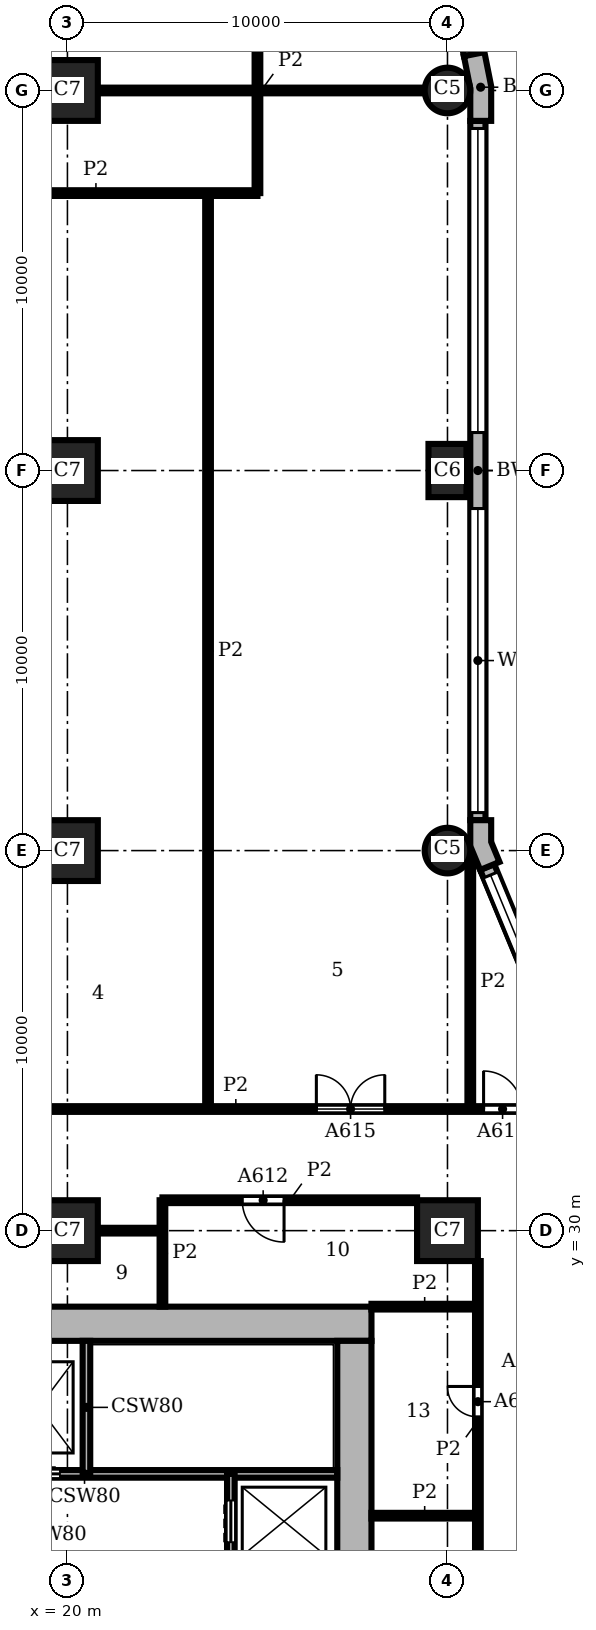
"""IFC4 building model, lengths in metres.
Left out: names, types, materials, properties, quantities, classifications, styles, units other than length and angle.
Written with IfcOpenShell. Run it as: python <this file> out.ifc"""

import sys

from ifc_helpers import new_model, si_unit, direction, frame, frame_2d, origin, origin_2d, place, context, subcontext, project, spatial, polyline, rectangle, circle, outline, extrude, element, fill, save


model = new_model("IFC4")
c1 = context("Model", 3, precision=1e-05, world=origin(), true_north=direction((0.0, 1.0)))
c2 = subcontext(c1, "Body", "Model", "MODEL_VIEW")
j1 = project(units=[si_unit("LENGTHUNIT", "METRE"), si_unit("PLANEANGLEUNIT", "RADIAN")], contexts=[c1])
p1 = place(None, origin())
s1 = spatial("IfcSite", under=j1, at=p1, CompositionType="ELEMENT")
p2 = place(p1, origin())
s2 = spatial("IfcBuilding", under=s1, at=p2, CompositionType="ELEMENT")
p3 = place(p2, frame((0.0, 0.0, 70.5)))
s3 = spatial("IfcBuildingStorey", under=s2, at=p3, CompositionType="ELEMENT", Elevation=70.5)
p4 = place(p3, frame((30.0, 40.0, 0.0), z_axis=(0.0, 0.0, 1.0), x_axis=(1.0, 0.0, 0.0)))
e1 = element("IfcColumn", 1, at=p4, inside=s3, PredefinedType="COLUMN", context=c2, shape_type="SweptSolid", body=[
    extrude(circle(Radius=0.6, at=origin_2d()), origin(), (0.0, 0.0, 1.0), 3.9),
])
p5 = place(p3, frame((30.0, 50.0, 0.0), z_axis=(0.0, 0.0, 1.0), x_axis=(0.0, 1.0, 0.0)))
e2 = element("IfcColumn", 2, at=p5, inside=s3, PredefinedType="COLUMN", context=c2, shape_type="SweptSolid", body=[
    extrude(rectangle(XDim=1.4, YDim=1.0, at=origin_2d()), origin(), (0.0, 0.0, 1.0), 3.9),
])
p6 = place(p3, frame((30.0, 60.0, 0.0), z_axis=(0.0, 0.0, 1.0), x_axis=(1.0, 0.0, 0.0)))
e3 = element("IfcColumn", 3, at=p6, inside=s3, PredefinedType="COLUMN", context=c2, shape_type="SweptSolid", body=[
    extrude(circle(Radius=0.6, at=origin_2d()), origin(), (0.0, 0.0, 1.0), 3.9),
])
for number, where, z_axis, x_axis in (
    (4, (20.0, 30.0, 0.0), (0.0, 0.0, 1.0), (1.0, 0.0, 0.0)),
    (5, (20.0, 40.0, 0.0), (0.0, 0.0, 1.0), (1.0, 0.0, 0.0)),
    (6, (20.0, 50.0, 0.0), (0.0, 0.0, 1.0), (1.0, 0.0, 0.0)),
    (7, (20.0, 60.0, 0.0), (0.0, 0.0, 1.0), (1.0, 0.0, 0.0)),
    (8, (30.0, 30.0, 0.0), (0.0, 0.0, 1.0), (1.0, 0.0, 0.0)),
):
    element("IfcColumn", number, at=place(p3, frame(where, z_axis=z_axis, x_axis=x_axis)), inside=s3, PredefinedType="COLUMN", context=c2, shape_type="SweptSolid", body=[
        extrude(rectangle(XDim=1.6, YDim=1.6, at=origin_2d()), origin(), (0.0, 0.0, 1.0), 3.9),
    ])
p7 = place(p3, frame((27.55, 8.9, 0.0), z_axis=(0.0, 0.0, 1.0), x_axis=(0.0, 1.0, 0.0)))
e9 = element("IfcWall", 9, at=p7, inside=s3, PredefinedType="SHEAR", context=c2, shape_type="SweptSolid", body=[
    extrude(rectangle(XDim=18.2, YDim=0.9, at=frame_2d((9.1, 0.0))), origin(), (0.0, 0.0, 1.0), 3.9),
])
p8 = place(p7, frame((4.55, 0.0, 0.0)))
e10 = element("IfcOpeningElement", 10, at=p8, cuts=e9, PredefinedType="OPENING", context=c2, shape_type="SweptSolid", body=[
    extrude(rectangle(XDim=1.6, YDim=2.1, at=frame_2d((0.8, 1.05))), frame((0.0, 0.46, 0.0), z_axis=(0.0, -1.0, 0.0), x_axis=(1.0, 0.0, 0.0)), (0.0, 0.0, 1.0), 0.92),
])
p9 = place(p3, frame((28.0, 27.55, 0.0), z_axis=(0.0, 0.0, 1.0), x_axis=(-1.0, 0.0, 0.0)))
e11 = element("IfcWall", 11, at=p9, inside=s3, PredefinedType="SHEAR", context=c2, shape_type="SweptSolid", body=[
    extrude(rectangle(XDim=20.0, YDim=0.9, at=frame_2d((10.0, 0.0))), origin(), (0.0, 0.0, 1.0), 3.9),
])
p10 = place(p3, origin())
e12 = element("IfcWall", 12, at=p10, inside=s3, PredefinedType="SOLIDWALL", context=c2, shape_type="SweptSolid", body=[
    extrude(outline(polyline([(31.23, 39.644), (31.369, 39.701), (31.15, 40.229), (31.15, 40.8), (31.0, 40.8), (30.6, 40.8), (30.6, 40.119), (30.861, 39.49), (31.23, 39.644)])), origin(), (0.0, 0.0, 1.0), 3.9),
])
e13 = element("IfcWall", 13, at=p10, inside=s3, PredefinedType="SOLIDWALL", context=c2, shape_type="SweptSolid", body=[
    extrude(outline(polyline([(31.0, 59.2), (31.15, 59.2), (31.15, 60.113), (30.972, 61.009), (30.825, 60.98), (30.432, 60.902), (30.6, 60.059), (30.6, 59.2), (31.0, 59.2)])), origin(), (0.0, 0.0, 1.0), 3.9),
])
p11 = place(p3, frame((33.362, 33.974, 0.0), z_axis=(0.0, 0.0, 1.0), x_axis=(-0.382655745237, 0.923891000409, 0.0)))
e14 = element("IfcWall", 14, at=p11, inside=s3, PredefinedType="SOLIDWALL", context=c2, shape_type="SweptSolid", body=[
    extrude(rectangle(XDim=6.053, YDim=0.4, at=frame_2d((3.027, 0.0))), origin(), (0.0, 0.0, 1.0), 3.9),
])
p12 = place(p11, frame((0.227, 0.0, 0.9)))
e15 = element("IfcOpeningElement", 15, at=p12, cuts=e14, PredefinedType="OPENING", context=c2, shape_type="SweptSolid", body=[
    extrude(rectangle(XDim=5.6, YDim=2.35, at=frame_2d((2.8, 1.175))), frame((0.0, 0.21, 0.0), z_axis=(0.0, -1.0, 0.0), x_axis=(1.0, 0.0, 0.0)), (0.0, 0.0, 1.0), 0.42),
])
p13 = place(p3, frame((30.8, 40.8, 0.0), z_axis=(0.0, 0.0, 1.0), x_axis=(0.0, 1.0, 0.0)))
e16 = element("IfcWall", 16, at=p13, inside=s3, PredefinedType="SOLIDWALL", context=c2, shape_type="SweptSolid", body=[
    extrude(rectangle(XDim=18.4, YDim=0.4, at=frame_2d((9.2, 0.0))), origin(), (0.0, 0.0, 1.0), 3.9),
])
p14 = place(p13, frame((0.2, 0.0, 0.9)))
e17 = element("IfcOpeningElement", 17, at=p14, cuts=e16, PredefinedType="OPENING", context=c2, shape_type="SweptSolid", body=[
    extrude(rectangle(XDim=8.0, YDim=2.35, at=frame_2d((4.0, 1.175))), frame((0.0, 0.21, 0.0), z_axis=(0.0, -1.0, 0.0), x_axis=(1.0, 0.0, 0.0)), (0.0, 0.0, 1.0), 0.42),
])
p15 = place(p13, frame((10.2, 0.0, 0.9)))
e18 = element("IfcOpeningElement", 18, at=p15, cuts=e16, PredefinedType="OPENING", context=c2, shape_type="SweptSolid", body=[
    extrude(rectangle(XDim=8.0, YDim=2.35, at=frame_2d((4.0, 1.175))), frame((0.0, 0.21, 0.0), z_axis=(0.0, -1.0, 0.0), x_axis=(1.0, 0.0, 0.0)), (0.0, 0.0, 1.0), 0.42),
])
p16 = place(p3, frame((30.629, 60.941, 0.0), z_axis=(0.0, 0.0, 1.0), x_axis=(-0.195098533057, 0.98078364709, 0.0)))
e19 = element("IfcWall", 19, at=p16, inside=s3, PredefinedType="SOLIDWALL", context=c2, shape_type="SweptSolid", body=[
    extrude(rectangle(XDim=4.753, YDim=0.4, at=frame_2d((2.376, 0.0))), origin(), (0.0, 0.0, 1.0), 3.9),
])
p17 = place(p16, frame((0.226, 0.0, 0.9)))
e20 = element("IfcOpeningElement", 20, at=p17, cuts=e19, PredefinedType="OPENING", context=c2, shape_type="SweptSolid", body=[
    extrude(rectangle(XDim=4.3, YDim=2.35, at=frame_2d((2.15, 1.175))), frame((0.0, 0.21, 0.0), z_axis=(0.0, -1.0, 0.0), x_axis=(1.0, 0.0, 0.0)), (0.0, 0.0, 1.0), 0.42),
])
p18 = place(p3, frame((13.8, 23.6, 0.0), z_axis=(0.0, 0.0, 1.0), x_axis=(1.0, 0.0, 0.0)))
e21 = element("IfcWall", 21, at=p18, inside=s3, PredefinedType="SHEAR", context=c2, shape_type="SweptSolid", body=[
    extrude(rectangle(XDim=13.3, YDim=0.2, at=frame_2d((6.65, 0.0))), origin(), (0.0, 0.0, 1.0), 3.58),
])
p19 = place(p18, frame((2.4, 0.0, 0.0)))
e22 = element("IfcOpeningElement", 22, at=p19, cuts=e21, PredefinedType="OPENING", context=c2, shape_type="SweptSolid", body=[
    extrude(rectangle(XDim=1.1, YDim=2.1, at=frame_2d((0.55, 1.05))), frame((0.0, 0.11, 0.0), z_axis=(0.0, -1.0, 0.0), x_axis=(1.0, 0.0, 0.0)), (0.0, 0.0, 1.0), 0.22),
])
p20 = place(p18, frame((4.9, 0.0, 0.0)))
e23 = element("IfcOpeningElement", 23, at=p20, cuts=e21, PredefinedType="OPENING", context=c2, shape_type="SweptSolid", body=[
    extrude(rectangle(XDim=1.1, YDim=2.1, at=frame_2d((0.55, 1.05))), frame((0.0, 0.11, 0.0), z_axis=(0.0, -1.0, 0.0), x_axis=(1.0, 0.0, 0.0)), (0.0, 0.0, 1.0), 0.22),
])
p21 = place(p18, frame((0.25, 0.0, 0.0)))
e24 = element("IfcOpeningElement", 24, at=p21, cuts=e21, PredefinedType="OPENING", context=c2, shape_type="SweptSolid", body=[
    extrude(rectangle(XDim=1.0, YDim=2.1, at=frame_2d((0.5, 1.05))), frame((0.0, 0.11, 0.0), z_axis=(0.0, -1.0, 0.0), x_axis=(1.0, 0.0, 0.0)), (0.0, 0.0, 1.0), 0.22),
])
p22 = place(p3, frame((20.5, 23.6, 0.0), z_axis=(0.0, 0.0, 1.0), x_axis=(0.0, 1.0, 0.0)))
e25 = element("IfcWall", 25, at=p22, inside=s3, PredefinedType="SHEAR", context=c2, shape_type="SweptSolid", body=[
    extrude(rectangle(XDim=3.5, YDim=0.2, at=frame_2d((1.75, 0.0))), origin(), (0.0, 0.0, 1.0), 3.58),
])
p23 = place(p3, frame((24.3, 16.1, 0.0), z_axis=(0.0, 0.0, 1.0), x_axis=(0.0, 1.0, 0.0)))
e26 = element("IfcWall", 26, at=p23, inside=s3, PredefinedType="SHEAR", context=c2, shape_type="SweptSolid", body=[
    extrude(rectangle(XDim=7.5, YDim=0.2, at=frame_2d((3.75, 0.0))), origin(), (0.0, 0.0, 1.0), 3.58),
])
p24 = place(p23, frame((5.7, 0.0, 0.0)))
e27 = element("IfcOpeningElement", 27, at=p24, cuts=e26, PredefinedType="OPENING", context=c2, shape_type="SweptSolid", body=[
    extrude(rectangle(XDim=1.1, YDim=2.1, at=frame_2d((0.55, 1.05))), frame((0.0, 0.11, 0.0), z_axis=(0.0, -1.0, 0.0), x_axis=(1.0, 0.0, 0.0)), (0.0, 0.0, 1.0), 0.22),
])
p25 = place(p3, frame((22.5, 28.0, 0.0), z_axis=(0.0, 0.0, 1.0), x_axis=(0.0, 1.0, 0.0)))
e28 = element("IfcWall", 28, at=p25, inside=s3, PredefinedType="PARTITIONING", context=c2, shape_type="SweptSolid", body=[
    extrude(rectangle(XDim=2.8, YDim=0.15, at=frame_2d((1.4, 0.0))), origin(), (0.0, 0.0, 1.0), 3.58),
])
p26 = place(p3, frame((23.7, 33.2, 0.0), z_axis=(0.0, 0.0, 1.0), x_axis=(0.0, 1.0, 0.0)))
e29 = element("IfcWall", 29, at=p26, inside=s3, PredefinedType="PARTITIONING", context=c2, shape_type="SweptSolid", body=[
    extrude(rectangle(XDim=24.1, YDim=0.15, at=frame_2d((12.05, 0.0))), origin(), (0.0, 0.0, 1.0), 3.58),
])
p27 = place(p3, frame((25.0, 57.3, 0.0), z_axis=(0.0, 0.0, 1.0), x_axis=(0.0, 1.0, 0.0)))
e30 = element("IfcWall", 30, at=p27, inside=s3, PredefinedType="PARTITIONING", context=c2, shape_type="SweptSolid", body=[
    extrude(rectangle(XDim=10.7, YDim=0.15, at=frame_2d((5.35, 0.0))), origin(), (0.0, 0.0, 1.0), 3.58),
])
p28 = place(p3, frame((30.6, 33.2, 0.0), z_axis=(0.0, 0.0, 1.0), x_axis=(0.0, 1.0, 0.0)))
e31 = element("IfcWall", 31, at=p28, inside=s3, PredefinedType="PARTITIONING", context=c2, shape_type="SweptSolid", body=[
    extrude(rectangle(XDim=6.699, YDim=0.15, at=frame_2d((3.35, 0.0))), origin(), (0.0, 0.0, 1.0), 3.58),
])
p29 = place(p3, frame((30.8, 20.8, 0.0), z_axis=(0.0, 0.0, 1.0), x_axis=(0.0, 1.0, 0.0)))
e32 = element("IfcWall", 32, at=p29, inside=s3, PredefinedType="PARTITIONING", context=c2, shape_type="SweptSolid", body=[
    extrude(rectangle(XDim=8.4, YDim=0.15, at=frame_2d((4.2, 0.0))), origin(), (0.0, 0.0, 1.0), 3.58),
])
p30 = place(p29, frame((4.3, 0.0, 0.0)))
e33 = element("IfcOpeningElement", 33, at=p30, cuts=e32, PredefinedType="OPENING", context=c2, shape_type="SweptSolid", body=[
    extrude(rectangle(XDim=0.8, YDim=2.1, at=frame_2d((0.4, 1.05))), frame((0.0, 0.085, 0.0), z_axis=(0.0, -1.0, 0.0), x_axis=(1.0, 0.0, 0.0)), (0.0, 0.0, 1.0), 0.17),
])
for number, where, z_axis, x_axis in (
    (34, (28.0, 22.5, 0.0), (0.0, 0.0, 1.0), (1.0, 0.0, 0.0)),
    (35, (28.0, 28.0, 0.0), (0.0, 0.0, 1.0), (1.0, 0.0, 0.0)),
):
    element("IfcWall", number, at=place(p3, frame(where, z_axis=z_axis, x_axis=x_axis)), inside=s3, PredefinedType="PARTITIONING", context=c2, shape_type="SweptSolid", body=[
        extrude(rectangle(XDim=2.8, YDim=0.15, at=frame_2d((1.4, 0.0))), origin(), (0.0, 0.0, 1.0), 3.58),
    ])
p31 = place(p3, frame((20.8, 30.0, 0.0), z_axis=(0.0, 0.0, 1.0), x_axis=(1.0, 0.0, 0.0)))
e36 = element("IfcWall", 36, at=p31, inside=s3, PredefinedType="PARTITIONING", context=c2, shape_type="SweptSolid", body=[
    extrude(rectangle(XDim=1.7, YDim=0.15, at=frame_2d((0.85, 0.0))), origin(), (0.0, 0.0, 1.0), 3.58),
])
p32 = place(p3, frame((22.5, 30.8, 0.0), z_axis=(0.0, 0.0, 1.0), x_axis=(1.0, 0.0, 0.0)))
e37 = element("IfcWall", 37, at=p32, inside=s3, PredefinedType="PARTITIONING", context=c2, shape_type="SweptSolid", body=[
    extrude(rectangle(XDim=6.7, YDim=0.15, at=frame_2d((3.35, 0.0))), origin(), (0.0, 0.0, 1.0), 3.58),
])
p33 = place(p32, frame((2.1, 0.0, 0.0)))
e38 = element("IfcOpeningElement", 38, at=p33, cuts=e37, PredefinedType="OPENING", context=c2, shape_type="SweptSolid", body=[
    extrude(rectangle(XDim=1.1, YDim=2.1, at=frame_2d((0.55, 1.05))), frame((0.0, 0.085, 0.0), z_axis=(0.0, -1.0, 0.0), x_axis=(1.0, 0.0, 0.0)), (0.0, 0.0, 1.0), 0.17),
])
p34 = place(p3, frame((16.5, 33.2, 0.0), z_axis=(0.0, 0.0, 1.0), x_axis=(1.0, 0.0, 0.0)))
e39 = element("IfcWall", 39, at=p34, inside=s3, PredefinedType="PARTITIONING", context=c2, shape_type="SweptSolid", body=[
    extrude(rectangle(XDim=15.862, YDim=0.15, at=frame_2d((7.931, 0.0))), origin(), (0.0, 0.0, 1.0), 3.58),
])
p35 = place(p34, frame((10.05, 0.0, 0.0)))
e40 = element("IfcOpeningElement", 40, at=p35, cuts=e39, PredefinedType="OPENING", context=c2, shape_type="SweptSolid", body=[
    extrude(rectangle(XDim=1.8, YDim=2.1, at=frame_2d((0.9, 1.05))), frame((0.0, 0.085, 0.0), z_axis=(0.0, -1.0, 0.0), x_axis=(1.0, 0.0, 0.0)), (0.0, 0.0, 1.0), 0.17),
])
p36 = place(p34, frame((14.45, 0.0, 0.0)))
e41 = element("IfcOpeningElement", 41, at=p36, cuts=e39, PredefinedType="OPENING", context=c2, shape_type="SweptSolid", body=[
    extrude(rectangle(XDim=1.0, YDim=2.1, at=frame_2d((0.5, 1.05))), frame((0.0, 0.085, 0.0), z_axis=(0.0, -1.0, 0.0), x_axis=(1.0, 0.0, 0.0)), (0.0, 0.0, 1.0), 0.17),
])
p37 = place(p3, frame((16.5, 57.3, 0.0), z_axis=(0.0, 0.0, 1.0), x_axis=(1.0, 0.0, 0.0)))
e42 = element("IfcWall", 42, at=p37, inside=s3, PredefinedType="PARTITIONING", context=c2, shape_type="SweptSolid", body=[
    extrude(rectangle(XDim=8.5, YDim=0.15, at=frame_2d((4.25, 0.0))), origin(), (0.0, 0.0, 1.0), 3.58),
])
p38 = place(p3, frame((20.8, 60.0, 0.0), z_axis=(0.0, 0.0, 1.0), x_axis=(1.0, 0.0, 0.0)))
e43 = element("IfcWall", 43, at=p38, inside=s3, PredefinedType="PARTITIONING", context=c2, shape_type="SweptSolid", body=[
    extrude(rectangle(XDim=8.6, YDim=0.15, at=frame_2d((4.3, 0.0))), origin(), (0.0, 0.0, 1.0), 3.58),
])
p39 = place(p12, origin())
e44 = element("IfcWindow", 44, at=p39, inside=s3, PartitioningType="SINGLE_PANEL", PredefinedType="WINDOW", context=c2, shape_type="SweptSolid", body=[
    extrude(rectangle(XDim=5.6, YDim=2.35, at=frame_2d((2.8, 1.175))), frame((0.0, 0.16, 0.0), z_axis=(0.0, -1.0, 0.0), x_axis=(1.0, 0.0, 0.0)), (0.0, 0.0, 1.0), 0.06),
])
fill(e15, e44)
p40 = place(p14, origin())
e45 = element("IfcWindow", 45, at=p40, inside=s3, PartitioningType="SINGLE_PANEL", PredefinedType="WINDOW", context=c2, shape_type="SweptSolid", body=[
    extrude(rectangle(XDim=8.0, YDim=2.35, at=frame_2d((4.0, 1.175))), frame((0.0, 0.16, 0.0), z_axis=(0.0, -1.0, 0.0), x_axis=(1.0, 0.0, 0.0)), (0.0, 0.0, 1.0), 0.06),
])
fill(e17, e45)
p41 = place(p15, origin())
e46 = element("IfcWindow", 46, at=p41, inside=s3, PartitioningType="SINGLE_PANEL", PredefinedType="WINDOW", context=c2, shape_type="SweptSolid", body=[
    extrude(rectangle(XDim=8.0, YDim=2.35, at=frame_2d((4.0, 1.175))), frame((0.0, 0.16, 0.0), z_axis=(0.0, -1.0, 0.0), x_axis=(1.0, 0.0, 0.0)), (0.0, 0.0, 1.0), 0.06),
])
fill(e18, e46)
p42 = place(p24, origin())
e47 = element("IfcDoor", 47, at=p42, inside=s3, OperationType="DOUBLE_DOOR_SLIDING", PredefinedType="DOOR", context=c2, shape_type="SweptSolid", body=[
    extrude(rectangle(XDim=1.1, YDim=2.1, at=frame_2d((0.55, 1.05))), frame((0.0, 0.025, 0.0), z_axis=(0.0, -1.0, 0.0), x_axis=(1.0, 0.0, 0.0)), (0.0, 0.0, 1.0), 0.05),
])
fill(e27, e47)
p43 = place(p20, origin())
e48 = element("IfcDoor", 48, at=p43, inside=s3, OperationType="DOUBLE_DOOR_SLIDING", PredefinedType="DOOR", context=c2, shape_type="SweptSolid", body=[
    extrude(rectangle(XDim=1.1, YDim=2.1, at=frame_2d((0.55, 1.05))), frame((0.0, 0.025, 0.0), z_axis=(0.0, -1.0, 0.0), x_axis=(1.0, 0.0, 0.0)), (0.0, 0.0, 1.0), 0.05),
])
fill(e23, e48)
p44 = place(p30, origin())
e49 = element("IfcDoor", 49, at=p44, inside=s3, OperationType="SINGLE_SWING_RIGHT", PredefinedType="DOOR", context=c2, shape_type="SweptSolid", body=[
    extrude(rectangle(XDim=0.8, YDim=2.1, at=frame_2d((0.4, 1.05))), frame((0.0, 0.025, 0.0), z_axis=(0.0, -1.0, 0.0), x_axis=(1.0, 0.0, 0.0)), (0.0, 0.0, 1.0), 0.05),
])
fill(e33, e49)
p45 = place(p33, frame((1.1, 0.0, 0.0), z_axis=(0.0, 0.0, 1.0), x_axis=(-1.0, 0.0, 0.0)))
e50 = element("IfcDoor", 50, at=p45, inside=s3, OperationType="SINGLE_SWING_LEFT", PredefinedType="DOOR", context=c2, shape_type="SweptSolid", body=[
    extrude(rectangle(XDim=1.1, YDim=2.1, at=frame_2d((0.55, 1.05))), frame((0.0, 0.025, 0.0), z_axis=(0.0, -1.0, 0.0), x_axis=(1.0, 0.0, 0.0)), (0.0, 0.0, 1.0), 0.05),
])
fill(e38, e50)
p46 = place(p35, origin())
e51 = element("IfcDoor", 51, at=p46, inside=s3, OperationType="DOUBLE_DOOR_SINGLE_SWING", PredefinedType="DOOR", context=c2, shape_type="SweptSolid", body=[
    extrude(rectangle(XDim=1.8, YDim=2.1, at=frame_2d((0.9, 1.05))), frame((0.0, 0.025, 0.0), z_axis=(0.0, -1.0, 0.0), x_axis=(1.0, 0.0, 0.0)), (0.0, 0.0, 1.0), 0.05),
])
fill(e40, e51)
p47 = place(p36, origin())
e52 = element("IfcDoor", 52, at=p47, inside=s3, OperationType="SINGLE_SWING_LEFT", PredefinedType="DOOR", context=c2, shape_type="SweptSolid", body=[
    extrude(rectangle(XDim=1.0, YDim=2.1, at=frame_2d((0.5, 1.05))), frame((0.0, 0.025, 0.0), z_axis=(0.0, -1.0, 0.0), x_axis=(1.0, 0.0, 0.0)), (0.0, 0.0, 1.0), 0.05),
])
fill(e41, e52)
save(model, sys.argv[1])
